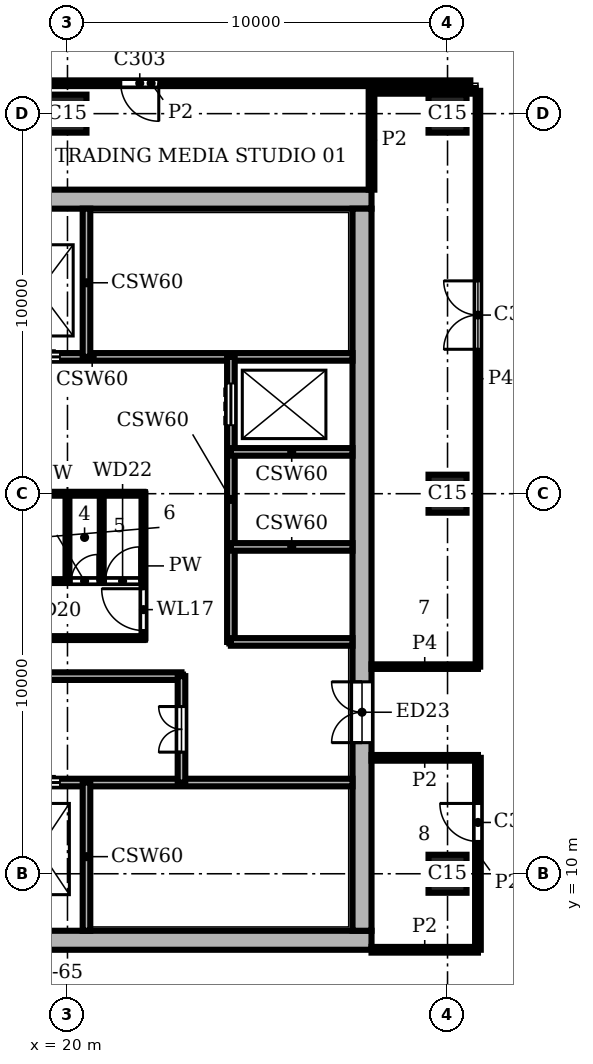
"""IFC4 building model, lengths in metres.
Left out: names, types, materials, properties, quantities, classifications, styles, units other than length and angle.
Written with IfcOpenShell. Run it as: python <this file> out.ifc"""

import sys

from ifc_helpers import new_model, si_unit, direction, frame, frame_2d, origin, origin_2d, place, context, subcontext, project, spatial, rectangle, extrude, element, fill, save


model = new_model("IFC4")
c1 = context("Model", 3, precision=1e-05, world=origin(), true_north=direction((0.0, 1.0)))
c2 = subcontext(c1, "Body", "Model", "MODEL_VIEW")
j1 = project(units=[si_unit("LENGTHUNIT", "METRE"), si_unit("PLANEANGLEUNIT", "RADIAN")], contexts=[c1])
p1 = place(None, origin())
s1 = spatial("IfcSite", under=j1, at=p1, CompositionType="ELEMENT")
p2 = place(p1, origin())
s2 = spatial("IfcBuilding", under=s1, at=p2, CompositionType="ELEMENT")
p3 = place(p2, frame((0.0, 0.0, 274.8)))
s3 = spatial("IfcBuildingStorey", under=s2, at=p3, CompositionType="ELEMENT", Elevation=274.8)
for number, where, z_axis, x_axis in (
    (1, (20.0, 30.0, 0.0), (0.0, 0.0, 1.0), (1.0, 0.0, 0.0)),
    (2, (30.0, 10.0, 0.0), (0.0, 0.0, 1.0), (1.0, 0.0, 0.0)),
    (3, (30.0, 20.0, 0.0), (0.0, 0.0, 1.0), (1.0, 0.0, 0.0)),
    (4, (30.0, 30.0, 0.0), (0.0, 0.0, 1.0), (1.0, 0.0, 0.0)),
):
    element("IfcColumn", number, at=place(p3, frame(where, z_axis=z_axis, x_axis=x_axis)), inside=s3, PredefinedType="COLUMN", context=c2, shape_type="SweptSolid", body=[
        extrude(rectangle(XDim=1.0, YDim=1.0, at=origin_2d()), origin(), (0.0, 0.0, 1.0), 3.9),
    ])
p4 = place(p3, frame((8.0, 8.25, 0.0), z_axis=(0.0, 0.0, 1.0), x_axis=(1.0, 0.0, 0.0)))
e5 = element("IfcWall", 5, at=p4, inside=s3, PredefinedType="SHEAR", context=c2, shape_type="SweptSolid", body=[
    extrude(rectangle(XDim=20.0, YDim=0.5, at=frame_2d((10.0, 0.0))), origin(), (0.0, 0.0, 1.0), 3.9),
])
p5 = place(p3, frame((27.75, 8.5, 0.0), z_axis=(0.0, 0.0, 1.0), x_axis=(0.0, 1.0, 0.0)))
e6 = element("IfcWall", 6, at=p5, inside=s3, PredefinedType="SHEAR", context=c2, shape_type="SweptSolid", body=[
    extrude(rectangle(XDim=19.0, YDim=0.5, at=frame_2d((9.5, 0.0))), origin(), (0.0, 0.0, 1.0), 3.9),
])
p6 = place(p5, frame((4.95, 0.0, 0.0)))
e7 = element("IfcOpeningElement", 7, at=p6, cuts=e6, PredefinedType="OPENING", context=c2, shape_type="SweptSolid", body=[
    extrude(rectangle(XDim=1.6, YDim=2.1, at=frame_2d((0.8, 1.05))), frame((0.0, 0.26, 0.0), z_axis=(0.0, -1.0, 0.0), x_axis=(1.0, 0.0, 0.0)), (0.0, 0.0, 1.0), 0.52),
])
p7 = place(p3, frame((28.0, 27.75, 0.0), z_axis=(0.0, 0.0, 1.0), x_axis=(-1.0, 0.0, 0.0)))
e8 = element("IfcWall", 8, at=p7, inside=s3, PredefinedType="SHEAR", context=c2, shape_type="SweptSolid", body=[
    extrude(rectangle(XDim=20.0, YDim=0.5, at=frame_2d((10.0, 0.0))), origin(), (0.0, 0.0, 1.0), 3.9),
])
p8 = place(p3, frame((13.8, 12.4, 0.0), z_axis=(0.0, 0.0, 1.0), x_axis=(1.0, 0.0, 0.0)))
e9 = element("IfcWall", 9, at=p8, inside=s3, PredefinedType="SHEAR", context=c2, shape_type="SweptSolid", body=[
    extrude(rectangle(XDim=13.7, YDim=0.2, at=frame_2d((6.85, 0.0))), origin(), (0.0, 0.0, 1.0), 3.58),
])
p9 = place(p8, frame((2.4, 0.0, 0.0)))
e10 = element("IfcOpeningElement", 10, at=p9, cuts=e9, PredefinedType="OPENING", context=c2, shape_type="SweptSolid", body=[
    extrude(rectangle(XDim=1.1, YDim=2.1, at=frame_2d((0.55, 1.05))), frame((0.0, 0.11, 0.0), z_axis=(0.0, -1.0, 0.0), x_axis=(1.0, 0.0, 0.0)), (0.0, 0.0, 1.0), 0.22),
])
p10 = place(p8, frame((4.9, 0.0, 0.0)))
e11 = element("IfcOpeningElement", 11, at=p10, cuts=e9, PredefinedType="OPENING", context=c2, shape_type="SweptSolid", body=[
    extrude(rectangle(XDim=1.1, YDim=2.1, at=frame_2d((0.55, 1.05))), frame((0.0, 0.11, 0.0), z_axis=(0.0, -1.0, 0.0), x_axis=(1.0, 0.0, 0.0)), (0.0, 0.0, 1.0), 0.22),
])
p11 = place(p8, frame((0.15, 0.0, 0.0)))
e12 = element("IfcOpeningElement", 12, at=p11, cuts=e9, PredefinedType="OPENING", context=c2, shape_type="SweptSolid", body=[
    extrude(rectangle(XDim=1.0, YDim=2.1, at=frame_2d((0.5, 1.05))), frame((0.0, 0.11, 0.0), z_axis=(0.0, -1.0, 0.0), x_axis=(1.0, 0.0, 0.0)), (0.0, 0.0, 1.0), 0.22),
])
p12 = place(p3, frame((13.3, 15.2, 0.0), z_axis=(0.0, 0.0, 1.0), x_axis=(1.0, 0.0, 0.0)))
e13 = element("IfcWall", 13, at=p12, inside=s3, PredefinedType="SHEAR", context=c2, shape_type="SweptSolid", body=[
    extrude(rectangle(XDim=9.7, YDim=0.2, at=frame_2d((4.85, 0.0))), origin(), (0.0, 0.0, 1.0), 3.58),
])
p13 = place(p3, frame((24.3, 16.1, 0.0), z_axis=(0.0, 0.0, 1.0), x_axis=(1.0, 0.0, 0.0)))
e14 = element("IfcWall", 14, at=p13, inside=s3, PredefinedType="SHEAR", context=c2, shape_type="SweptSolid", body=[
    extrude(rectangle(XDim=3.2, YDim=0.2, at=frame_2d((1.6, 0.0))), origin(), (0.0, 0.0, 1.0), 3.58),
])
p14 = place(p3, frame((14.0, 16.2, 0.0), z_axis=(0.0, 0.0, 1.0), x_axis=(1.0, 0.0, 0.0)))
e15 = element("IfcWall", 15, at=p14, inside=s3, PredefinedType="PARTITIONING", context=c2, shape_type="SweptSolid", body=[
    extrude(rectangle(XDim=8.0, YDim=0.1, at=frame_2d((4.0, 0.0))), origin(), (0.0, 0.0, 1.0), 3.58),
])
p15 = place(p3, frame((14.0, 17.7, 0.0), z_axis=(0.0, 0.0, 1.0), x_axis=(1.0, 0.0, 0.0)))
e16 = element("IfcWall", 16, at=p15, inside=s3, PredefinedType="PARTITIONING", context=c2, shape_type="SweptSolid", body=[
    extrude(rectangle(XDim=8.0, YDim=0.1, at=frame_2d((4.0, 0.0))), origin(), (0.0, 0.0, 1.0), 3.58),
])
p16 = place(p15, frame((0.5, 0.0, 0.0)))
e17 = element("IfcOpeningElement", 17, at=p16, cuts=e16, PredefinedType="OPENING", context=c2, shape_type="SweptSolid", body=[
    extrude(rectangle(XDim=0.9, YDim=2.1, at=frame_2d((0.45, 1.05))), frame((0.0, 0.06, 0.0), z_axis=(0.0, -1.0, 0.0), x_axis=(1.0, 0.0, 0.0)), (0.0, 0.0, 1.0), 0.12),
])
p17 = place(p15, frame((2.3, 0.0, 0.0)))
e18 = element("IfcOpeningElement", 18, at=p17, cuts=e16, PredefinedType="OPENING", context=c2, shape_type="SweptSolid", body=[
    extrude(rectangle(XDim=0.9, YDim=2.1, at=frame_2d((0.45, 1.05))), frame((0.0, 0.06, 0.0), z_axis=(0.0, -1.0, 0.0), x_axis=(1.0, 0.0, 0.0)), (0.0, 0.0, 1.0), 0.12),
])
p18 = place(p15, frame((4.35, 0.0, 0.0)))
e19 = element("IfcOpeningElement", 19, at=p18, cuts=e16, PredefinedType="OPENING", context=c2, shape_type="SweptSolid", body=[
    extrude(rectangle(XDim=0.9, YDim=2.1, at=frame_2d((0.45, 1.05))), frame((0.0, 0.06, 0.0), z_axis=(0.0, -1.0, 0.0), x_axis=(1.0, 0.0, 0.0)), (0.0, 0.0, 1.0), 0.12),
])
p19 = place(p15, frame((6.1, 0.0, 0.0)))
e20 = element("IfcOpeningElement", 20, at=p19, cuts=e16, PredefinedType="OPENING", context=c2, shape_type="SweptSolid", body=[
    extrude(rectangle(XDim=0.7, YDim=2.1, at=frame_2d((0.35, 1.05))), frame((0.0, 0.06, 0.0), z_axis=(0.0, -1.0, 0.0), x_axis=(1.0, 0.0, 0.0)), (0.0, 0.0, 1.0), 0.12),
])
p20 = place(p15, frame((7.0, 0.0, 0.0)))
e21 = element("IfcOpeningElement", 21, at=p20, cuts=e16, PredefinedType="OPENING", context=c2, shape_type="SweptSolid", body=[
    extrude(rectangle(XDim=0.9, YDim=2.1, at=frame_2d((0.45, 1.05))), frame((0.0, 0.06, 0.0), z_axis=(0.0, -1.0, 0.0), x_axis=(1.0, 0.0, 0.0)), (0.0, 0.0, 1.0), 0.12),
])
p21 = place(p3, frame((24.3, 18.6, 0.0), z_axis=(0.0, 0.0, 1.0), x_axis=(1.0, 0.0, 0.0)))
e22 = element("IfcWall", 22, at=p21, inside=s3, PredefinedType="SHEAR", context=c2, shape_type="SweptSolid", body=[
    extrude(rectangle(XDim=3.2, YDim=0.2, at=frame_2d((1.6, 0.0))), origin(), (0.0, 0.0, 1.0), 3.58),
])
p22 = place(p3, frame((18.0, 20.0, 0.0), z_axis=(0.0, 0.0, 1.0), x_axis=(1.0, 0.0, 0.0)))
e23 = element("IfcWall", 23, at=p22, inside=s3, PredefinedType="PARTITIONING", context=c2, shape_type="SweptSolid", body=[
    extrude(rectangle(XDim=4.0, YDim=0.1, at=frame_2d((2.0, 0.0))), origin(), (0.0, 0.0, 1.0), 3.58),
])
p23 = place(p3, frame((24.3, 21.1, 0.0), z_axis=(0.0, 0.0, 1.0), x_axis=(1.0, 0.0, 0.0)))
e24 = element("IfcWall", 24, at=p23, inside=s3, PredefinedType="SHEAR", context=c2, shape_type="SweptSolid", body=[
    extrude(rectangle(XDim=3.2, YDim=0.2, at=frame_2d((1.6, 0.0))), origin(), (0.0, 0.0, 1.0), 3.58),
])
p24 = place(p3, frame((13.8, 23.6, 0.0), z_axis=(0.0, 0.0, 1.0), x_axis=(1.0, 0.0, 0.0)))
e25 = element("IfcWall", 25, at=p24, inside=s3, PredefinedType="SHEAR", context=c2, shape_type="SweptSolid", body=[
    extrude(rectangle(XDim=13.7, YDim=0.2, at=frame_2d((6.85, 0.0))), origin(), (0.0, 0.0, 1.0), 3.58),
])
p25 = place(p24, frame((2.4, 0.0, 0.0)))
e26 = element("IfcOpeningElement", 26, at=p25, cuts=e25, PredefinedType="OPENING", context=c2, shape_type="SweptSolid", body=[
    extrude(rectangle(XDim=1.1, YDim=2.1, at=frame_2d((0.55, 1.05))), frame((0.0, 0.11, 0.0), z_axis=(0.0, -1.0, 0.0), x_axis=(1.0, 0.0, 0.0)), (0.0, 0.0, 1.0), 0.22),
])
p26 = place(p24, frame((4.9, 0.0, 0.0)))
e27 = element("IfcOpeningElement", 27, at=p26, cuts=e25, PredefinedType="OPENING", context=c2, shape_type="SweptSolid", body=[
    extrude(rectangle(XDim=1.1, YDim=2.1, at=frame_2d((0.55, 1.05))), frame((0.0, 0.11, 0.0), z_axis=(0.0, -1.0, 0.0), x_axis=(1.0, 0.0, 0.0)), (0.0, 0.0, 1.0), 0.22),
])
p27 = place(p24, frame((0.15, 0.0, 0.0)))
e28 = element("IfcOpeningElement", 28, at=p27, cuts=e25, PredefinedType="OPENING", context=c2, shape_type="SweptSolid", body=[
    extrude(rectangle(XDim=1.0, YDim=2.1, at=frame_2d((0.5, 1.05))), frame((0.0, 0.11, 0.0), z_axis=(0.0, -1.0, 0.0), x_axis=(1.0, 0.0, 0.0)), (0.0, 0.0, 1.0), 0.22),
])
p28 = place(p3, frame((20.0, 17.7, 0.0), z_axis=(0.0, 0.0, 1.0), x_axis=(0.0, 1.0, 0.0)))
e29 = element("IfcWall", 29, at=p28, inside=s3, PredefinedType="PARTITIONING", context=c2, shape_type="SweptSolid", body=[
    extrude(rectangle(XDim=2.3, YDim=0.1, at=frame_2d((1.15, 0.0))), origin(), (0.0, 0.0, 1.0), 3.58),
])
for number, where, z_axis, x_axis in (
    (30, (20.5, 8.5, 0.0), (0.0, 0.0, 1.0), (0.0, 1.0, 0.0)),
    (31, (20.5, 23.6, 0.0), (0.0, 0.0, 1.0), (0.0, 1.0, 0.0)),
):
    element("IfcWall", number, at=place(p3, frame(where, z_axis=z_axis, x_axis=x_axis)), inside=s3, PredefinedType="SHEAR", context=c2, shape_type="SweptSolid", body=[
        extrude(rectangle(XDim=3.9, YDim=0.2, at=frame_2d((1.95, 0.0))), origin(), (0.0, 0.0, 1.0), 3.58),
    ])
p29 = place(p3, frame((20.9, 17.7, 0.0), z_axis=(0.0, 0.0, 1.0), x_axis=(0.0, 1.0, 0.0)))
e32 = element("IfcWall", 32, at=p29, inside=s3, PredefinedType="PARTITIONING", context=c2, shape_type="SweptSolid", body=[
    extrude(rectangle(XDim=2.3, YDim=0.1, at=frame_2d((1.15, 0.0))), origin(), (0.0, 0.0, 1.0), 3.58),
])
p30 = place(p3, frame((22.0, 16.2, 0.0), z_axis=(0.0, 0.0, 1.0), x_axis=(0.0, 1.0, 0.0)))
e33 = element("IfcWall", 33, at=p30, inside=s3, PredefinedType="PARTITIONING", context=c2, shape_type="SweptSolid", body=[
    extrude(rectangle(XDim=3.8, YDim=0.1, at=frame_2d((1.9, 0.0))), origin(), (0.0, 0.0, 1.0), 3.58),
])
p31 = place(p30, frame((0.2, 0.0, 0.0)))
e34 = element("IfcOpeningElement", 34, at=p31, cuts=e33, PredefinedType="OPENING", context=c2, shape_type="SweptSolid", body=[
    extrude(rectangle(XDim=1.1, YDim=2.1, at=frame_2d((0.55, 1.05))), frame((0.0, 0.06, 0.0), z_axis=(0.0, -1.0, 0.0), x_axis=(1.0, 0.0, 0.0)), (0.0, 0.0, 1.0), 0.12),
])
p32 = place(p3, frame((23.0, 12.4, 0.0), z_axis=(0.0, 0.0, 1.0), x_axis=(0.0, 1.0, 0.0)))
e35 = element("IfcWall", 35, at=p32, inside=s3, PredefinedType="SHEAR", context=c2, shape_type="SweptSolid", body=[
    extrude(rectangle(XDim=2.8, YDim=0.2, at=frame_2d((1.4, 0.0))), origin(), (0.0, 0.0, 1.0), 3.58),
])
p33 = place(p32, frame((0.8, 0.0, 0.0)))
e36 = element("IfcOpeningElement", 36, at=p33, cuts=e35, PredefinedType="OPENING", context=c2, shape_type="SweptSolid", body=[
    extrude(rectangle(XDim=1.2, YDim=2.1, at=frame_2d((0.6, 1.05))), frame((0.0, 0.11, 0.0), z_axis=(0.0, -1.0, 0.0), x_axis=(1.0, 0.0, 0.0)), (0.0, 0.0, 1.0), 0.22),
])
p34 = place(p3, frame((24.3, 16.1, 0.0), z_axis=(0.0, 0.0, 1.0), x_axis=(0.0, 1.0, 0.0)))
e37 = element("IfcWall", 37, at=p34, inside=s3, PredefinedType="SHEAR", context=c2, shape_type="SweptSolid", body=[
    extrude(rectangle(XDim=7.5, YDim=0.2, at=frame_2d((3.75, 0.0))), origin(), (0.0, 0.0, 1.0), 3.58),
])
p35 = place(p34, frame((5.7, 0.0, 0.0)))
e38 = element("IfcOpeningElement", 38, at=p35, cuts=e37, PredefinedType="OPENING", context=c2, shape_type="SweptSolid", body=[
    extrude(rectangle(XDim=1.1, YDim=2.1, at=frame_2d((0.55, 1.05))), frame((0.0, 0.11, 0.0), z_axis=(0.0, -1.0, 0.0), x_axis=(1.0, 0.0, 0.0)), (0.0, 0.0, 1.0), 0.22),
])
p36 = place(p3, frame((28.0, 28.0, 0.0), z_axis=(0.0, 0.0, 1.0), x_axis=(0.0, 1.0, 0.0)))
e39 = element("IfcWall", 39, at=p36, inside=s3, PredefinedType="PARTITIONING", context=c2, shape_type="SweptSolid", body=[
    extrude(rectangle(XDim=2.598, YDim=0.15, at=frame_2d((1.299, 0.0))), origin(), (0.0, 0.0, 1.0), 3.58),
])
p37 = place(p3, frame((30.8, 8.0, 0.0), z_axis=(0.0, 0.0, 1.0), x_axis=(0.0, 1.0, 0.0)))
e40 = element("IfcWall", 40, at=p37, inside=s3, PredefinedType="PARTITIONING", context=c2, shape_type="SweptSolid", body=[
    extrude(rectangle(XDim=5.05, YDim=0.15, at=frame_2d((2.525, 0.0))), origin(), (0.0, 0.0, 1.0), 3.58),
])
p38 = place(p37, frame((2.85, 0.0, 0.0)))
e41 = element("IfcOpeningElement", 41, at=p38, cuts=e40, PredefinedType="OPENING", context=c2, shape_type="SweptSolid", body=[
    extrude(rectangle(XDim=1.0, YDim=2.1, at=frame_2d((0.5, 1.05))), frame((0.0, 0.085, 0.0), z_axis=(0.0, -1.0, 0.0), x_axis=(1.0, 0.0, 0.0)), (0.0, 0.0, 1.0), 0.17),
])
for number, where, z_axis, x_axis in (
    (42, (28.0, 8.0, 0.0), (0.0, 0.0, 1.0), (1.0, 0.0, 0.0)),
    (43, (28.0, 13.05, 0.0), (0.0, 0.0, 1.0), (1.0, 0.0, 0.0)),
):
    element("IfcWall", number, at=place(p3, frame(where, z_axis=z_axis, x_axis=x_axis)), inside=s3, PredefinedType="PARTITIONING", context=c2, shape_type="SweptSolid", body=[
        extrude(rectangle(XDim=2.8, YDim=0.15, at=frame_2d((1.4, 0.0))), origin(), (0.0, 0.0, 1.0), 3.58),
    ])
p39 = place(p3, frame((28.002, 30.6, 0.0), z_axis=(0.0, 0.0, 1.0), x_axis=(1.0, 0.0, 0.0)))
e44 = element("IfcWall", 44, at=p39, inside=s3, PredefinedType="PARTITIONING", context=c2, shape_type="SweptSolid", body=[
    extrude(rectangle(XDim=2.738, YDim=0.15, at=frame_2d((1.369, 0.0))), origin(), (0.0, 0.0, 1.0), 3.58),
])
p40 = place(p3, frame((13.802, 30.8, 0.0), z_axis=(0.0, 0.0, 1.0), x_axis=(1.0, 0.0, 0.0)))
e45 = element("IfcWall", 45, at=p40, inside=s3, PredefinedType="PARTITIONING", context=c2, shape_type="SweptSolid", body=[
    extrude(rectangle(XDim=16.798, YDim=0.15, at=frame_2d((8.399, 0.0))), origin(), (0.0, 0.0, 1.0), 3.58),
])
p41 = place(p40, frame((7.6, 0.0, 0.0)))
e46 = element("IfcOpeningElement", 46, at=p41, cuts=e45, PredefinedType="OPENING", context=c2, shape_type="SweptSolid", body=[
    extrude(rectangle(XDim=1.0, YDim=2.1, at=frame_2d((0.5, 1.05))), frame((0.0, 0.085, 0.0), z_axis=(0.0, -1.0, 0.0), x_axis=(1.0, 0.0, 0.0)), (0.0, 0.0, 1.0), 0.17),
])
p42 = place(p3, frame((30.8, 15.45, 0.0), z_axis=(0.0, 0.0, 1.0), x_axis=(0.0, 1.0, 0.0)))
e47 = element("IfcWall", 47, at=p42, inside=s3, PredefinedType="PARTITIONING", context=c2, shape_type="SweptSolid", body=[
    extrude(rectangle(XDim=15.15, YDim=0.12, at=frame_2d((7.575, 0.0))), origin(), (0.0, 0.0, 1.0), 3.58),
])
p43 = place(p42, frame((8.35, 0.0, 0.0)))
e48 = element("IfcOpeningElement", 48, at=p43, cuts=e47, PredefinedType="OPENING", context=c2, shape_type="SweptSolid", body=[
    extrude(rectangle(XDim=1.8, YDim=2.1, at=frame_2d((0.9, 1.05))), frame((0.0, 0.07, 0.0), z_axis=(0.0, -1.0, 0.0), x_axis=(1.0, 0.0, 0.0)), (0.0, 0.0, 1.0), 0.14),
])
p44 = place(p3, frame((28.0, 15.45, 0.0), z_axis=(0.0, 0.0, 1.0), x_axis=(1.0, 0.0, 0.0)))
e49 = element("IfcWall", 49, at=p44, inside=s3, PredefinedType="PARTITIONING", context=c2, shape_type="SweptSolid", body=[
    extrude(rectangle(XDim=2.8, YDim=0.12, at=frame_2d((1.4, 0.0))), origin(), (0.0, 0.0, 1.0), 3.58),
])
p45 = place(p35, origin())
e50 = element("IfcDoor", 50, at=p45, inside=s3, OperationType="DOUBLE_DOOR_SLIDING", PredefinedType="DOOR", context=c2, shape_type="SweptSolid", body=[
    extrude(rectangle(XDim=1.1, YDim=2.1, at=frame_2d((0.55, 1.05))), frame((0.0, 0.025, 0.0), z_axis=(0.0, -1.0, 0.0), x_axis=(1.0, 0.0, 0.0)), (0.0, 0.0, 1.0), 0.05),
])
fill(e38, e50)
p46 = place(p10, origin())
e51 = element("IfcDoor", 51, at=p46, inside=s3, OperationType="DOUBLE_DOOR_SLIDING", PredefinedType="DOOR", context=c2, shape_type="SweptSolid", body=[
    extrude(rectangle(XDim=1.1, YDim=2.1, at=frame_2d((0.55, 1.05))), frame((0.0, 0.025, 0.0), z_axis=(0.0, -1.0, 0.0), x_axis=(1.0, 0.0, 0.0)), (0.0, 0.0, 1.0), 0.05),
])
fill(e11, e51)
p47 = place(p26, origin())
e52 = element("IfcDoor", 52, at=p47, inside=s3, OperationType="DOUBLE_DOOR_SLIDING", PredefinedType="DOOR", context=c2, shape_type="SweptSolid", body=[
    extrude(rectangle(XDim=1.1, YDim=2.1, at=frame_2d((0.55, 1.05))), frame((0.0, 0.025, 0.0), z_axis=(0.0, -1.0, 0.0), x_axis=(1.0, 0.0, 0.0)), (0.0, 0.0, 1.0), 0.05),
])
fill(e27, e52)
p48 = place(p33, origin())
e53 = element("IfcDoor", 53, at=p48, inside=s3, OperationType="DOUBLE_DOOR_SINGLE_SWING", PredefinedType="DOOR", context=c2, shape_type="SweptSolid", body=[
    extrude(rectangle(XDim=1.2, YDim=2.1, at=frame_2d((0.6, 1.05))), frame((0.0, 0.025, 0.0), z_axis=(0.0, -1.0, 0.0), x_axis=(1.0, 0.0, 0.0)), (0.0, 0.0, 1.0), 0.05),
])
fill(e36, e53)
p49 = place(p31, origin())
e54 = element("IfcDoor", 54, at=p49, inside=s3, OperationType="SINGLE_SWING_RIGHT", PredefinedType="DOOR", context=c2, shape_type="SweptSolid", body=[
    extrude(rectangle(XDim=1.1, YDim=2.1, at=frame_2d((0.55, 1.05))), frame((0.0, 0.025, 0.0), z_axis=(0.0, -1.0, 0.0), x_axis=(1.0, 0.0, 0.0)), (0.0, 0.0, 1.0), 0.05),
])
fill(e34, e54)
p50 = place(p19, origin())
e55 = element("IfcDoor", 55, at=p50, inside=s3, OperationType="SINGLE_SWING_RIGHT", PredefinedType="DOOR", context=c2, shape_type="SweptSolid", body=[
    extrude(rectangle(XDim=0.7, YDim=2.1, at=frame_2d((0.35, 1.05))), frame((0.0, 0.025, 0.0), z_axis=(0.0, -1.0, 0.0), x_axis=(1.0, 0.0, 0.0)), (0.0, 0.0, 1.0), 0.05),
])
fill(e20, e55)
p51 = place(p20, origin())
e56 = element("IfcDoor", 56, at=p51, inside=s3, OperationType="SINGLE_SWING_RIGHT", PredefinedType="DOOR", context=c2, shape_type="SweptSolid", body=[
    extrude(rectangle(XDim=0.9, YDim=2.1, at=frame_2d((0.45, 1.05))), frame((0.0, 0.025, 0.0), z_axis=(0.0, -1.0, 0.0), x_axis=(1.0, 0.0, 0.0)), (0.0, 0.0, 1.0), 0.05),
])
fill(e21, e56)
p52 = place(p6, origin())
e57 = element("IfcDoor", 57, at=p52, inside=s3, OperationType="DOUBLE_DOOR_SINGLE_SWING", PredefinedType="DOOR", context=c2, shape_type="SweptSolid", body=[
    extrude(rectangle(XDim=1.6, YDim=2.1, at=frame_2d((0.8, 1.05))), frame((0.0, 0.025, 0.0), z_axis=(0.0, -1.0, 0.0), x_axis=(1.0, 0.0, 0.0)), (0.0, 0.0, 1.0), 0.05),
])
fill(e7, e57)
p53 = place(p41, frame((1.0, 0.0, 0.0), z_axis=(0.0, 0.0, 1.0), x_axis=(-1.0, 0.0, 0.0)))
e58 = element("IfcDoor", 58, at=p53, inside=s3, OperationType="SINGLE_SWING_LEFT", PredefinedType="DOOR", context=c2, shape_type="SweptSolid", body=[
    extrude(rectangle(XDim=1.0, YDim=2.1, at=frame_2d((0.5, 1.05))), frame((0.0, 0.025, 0.0), z_axis=(0.0, -1.0, 0.0), x_axis=(1.0, 0.0, 0.0)), (0.0, 0.0, 1.0), 0.05),
])
fill(e46, e58)
p54 = place(p43, origin())
e59 = element("IfcDoor", 59, at=p54, inside=s3, OperationType="DOUBLE_DOOR_SINGLE_SWING", PredefinedType="DOOR", context=c2, shape_type="SweptSolid", body=[
    extrude(rectangle(XDim=1.8, YDim=2.1, at=frame_2d((0.9, 1.05))), frame((0.0, 0.025, 0.0), z_axis=(0.0, -1.0, 0.0), x_axis=(1.0, 0.0, 0.0)), (0.0, 0.0, 1.0), 0.05),
])
fill(e48, e59)
p55 = place(p38, origin())
e60 = element("IfcDoor", 60, at=p55, inside=s3, OperationType="SINGLE_SWING_RIGHT", PredefinedType="DOOR", context=c2, shape_type="SweptSolid", body=[
    extrude(rectangle(XDim=1.0, YDim=2.1, at=frame_2d((0.5, 1.05))), frame((0.0, 0.025, 0.0), z_axis=(0.0, -1.0, 0.0), x_axis=(1.0, 0.0, 0.0)), (0.0, 0.0, 1.0), 0.05),
])
fill(e41, e60)
save(model, sys.argv[1])
